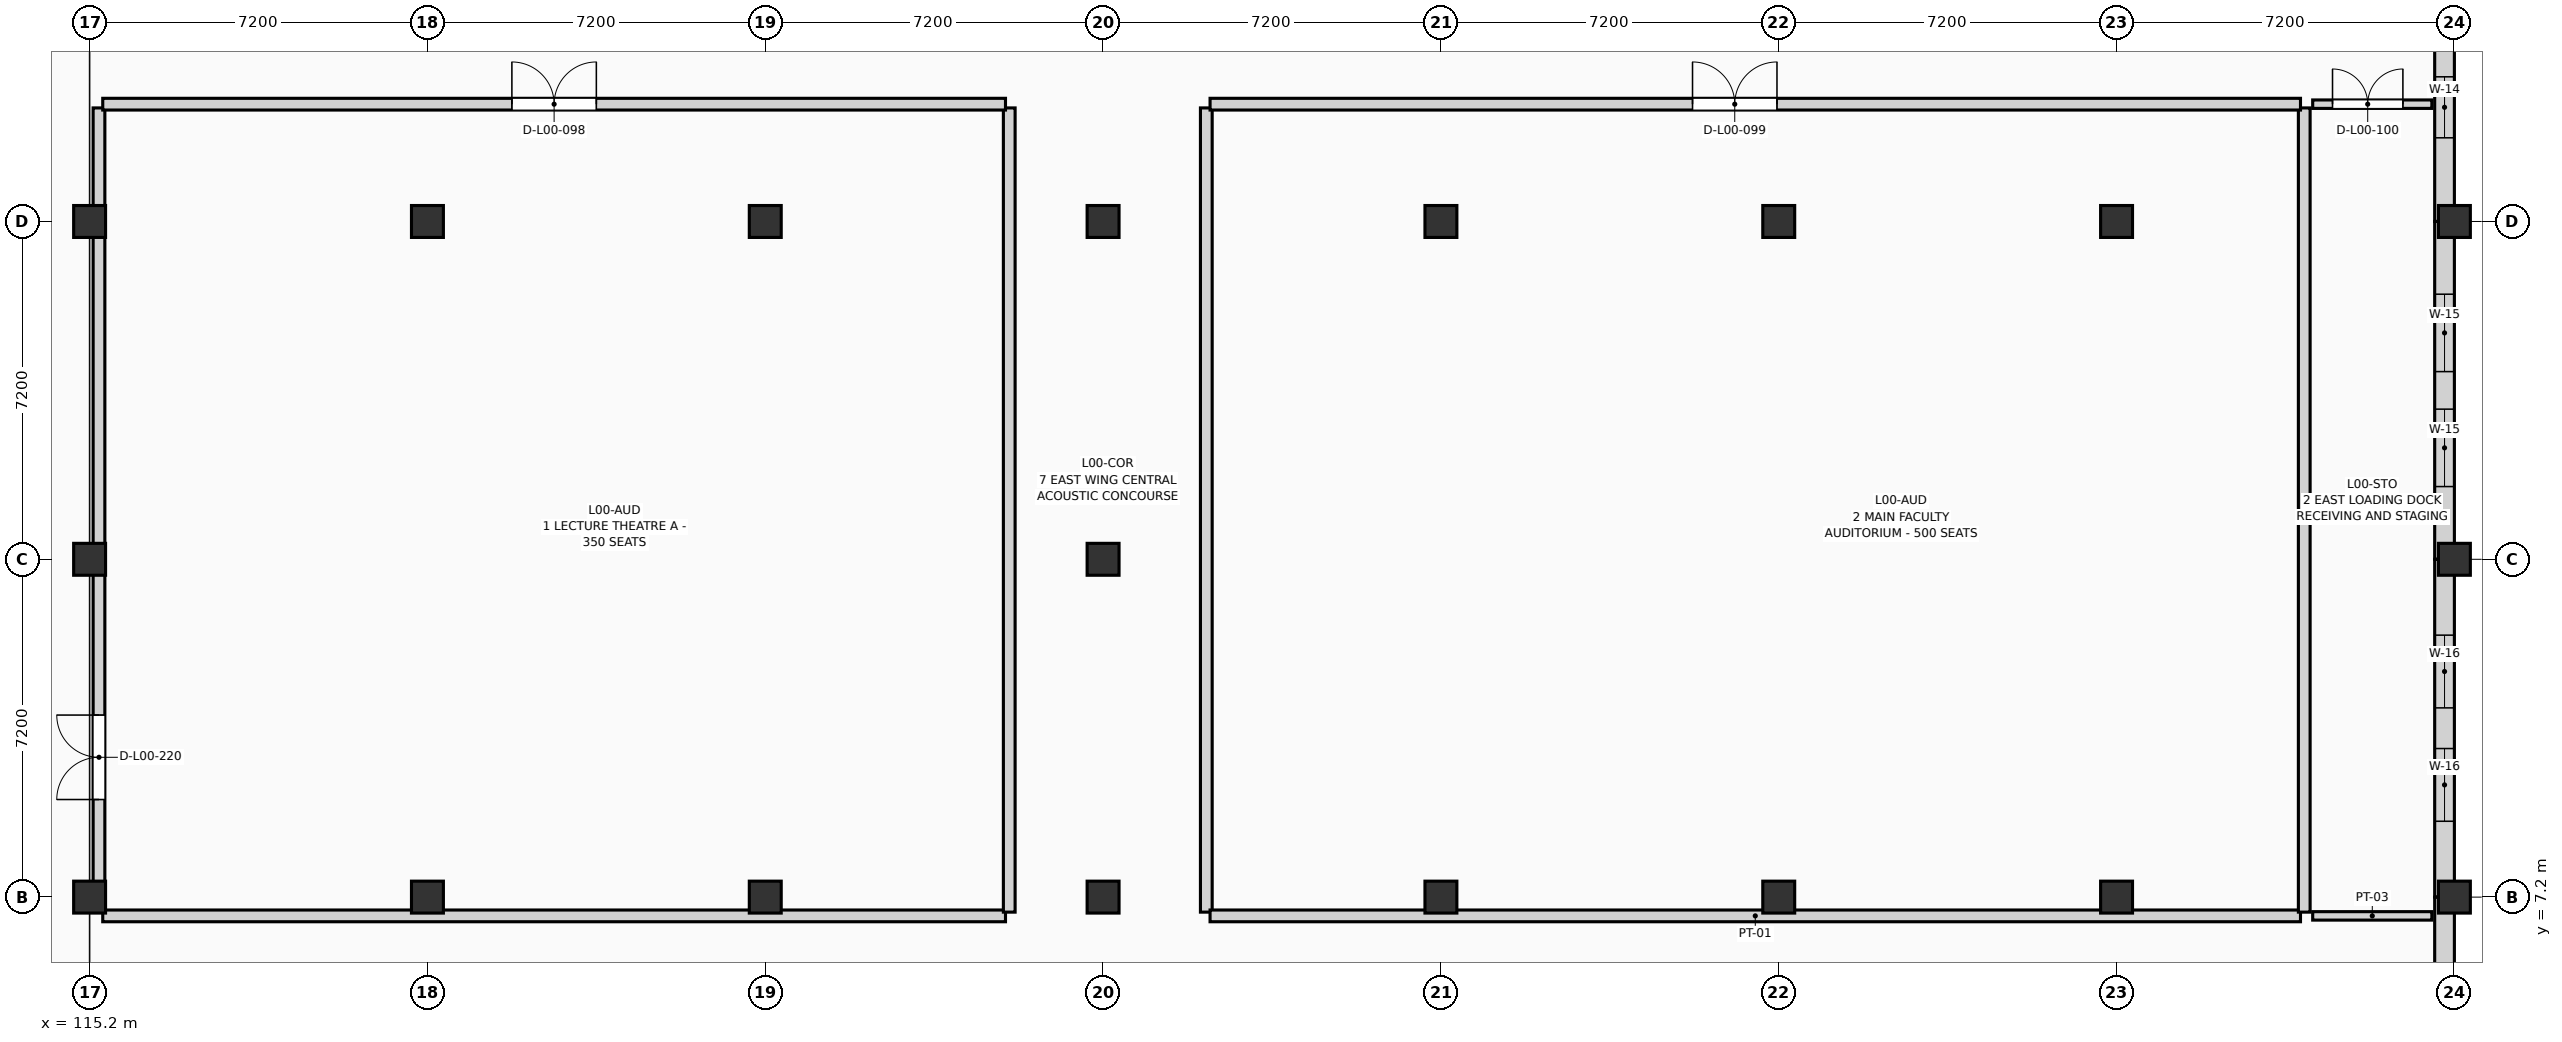
"""IFC4 building model, lengths in metres.
Left out: names, types, materials, properties, quantities, classifications, styles, units other than length and angle.
Written with IfcOpenShell. Run it as: python <this file> out.ifc"""

import sys

from ifc_helpers import new_model, si_unit, direction, frame, frame_2d, origin, origin_2d, place, context, subcontext, project, spatial, rectangle, extrude, element, fill, save


model = new_model("IFC4")
c1 = context("Model", 3, precision=1e-05, world=origin(), true_north=direction((0.0, 1.0)))
c2 = subcontext(c1, "Body", "Model", "MODEL_VIEW")
j1 = project(units=[si_unit("LENGTHUNIT", "METRE"), si_unit("PLANEANGLEUNIT", "RADIAN")], contexts=[c1])
p1 = place(None, origin())
s1 = spatial("IfcSite", under=j1, at=p1, CompositionType="ELEMENT")
p2 = place(p1, origin())
s2 = spatial("IfcBuilding", under=s1, at=p2, CompositionType="ELEMENT")
p3 = place(p2, origin())
s3 = spatial("IfcBuildingStorey", under=s2, at=p3, CompositionType="ELEMENT", Elevation=0.0)
for number, where, z_axis, x_axis in (
    (1, (115.2, 7.2, 0.0), (0.0, 0.0, 1.0), (1.0, 0.0, 0.0)),
    (2, (115.2, 14.4, 0.0), (0.0, 0.0, 1.0), (1.0, 0.0, 0.0)),
    (3, (115.2, 21.6, 0.0), (0.0, 0.0, 1.0), (1.0, 0.0, 0.0)),
    (4, (122.4, 7.2, 0.0), (0.0, 0.0, 1.0), (1.0, 0.0, 0.0)),
    (5, (122.4, 21.6, 0.0), (0.0, 0.0, 1.0), (1.0, 0.0, 0.0)),
    (6, (129.6, 7.2, 0.0), (0.0, 0.0, 1.0), (1.0, 0.0, 0.0)),
    (7, (129.6, 21.6, 0.0), (0.0, 0.0, 1.0), (1.0, 0.0, 0.0)),
    (8, (136.8, 7.2, 0.0), (0.0, 0.0, 1.0), (1.0, 0.0, 0.0)),
    (9, (136.8, 14.4, 0.0), (0.0, 0.0, 1.0), (1.0, 0.0, 0.0)),
    (10, (136.8, 21.6, 0.0), (0.0, 0.0, 1.0), (1.0, 0.0, 0.0)),
    (11, (144.0, 7.2, 0.0), (0.0, 0.0, 1.0), (1.0, 0.0, 0.0)),
    (12, (144.0, 21.6, 0.0), (0.0, 0.0, 1.0), (1.0, 0.0, 0.0)),
    (13, (151.2, 7.2, 0.0), (0.0, 0.0, 1.0), (1.0, 0.0, 0.0)),
    (14, (151.2, 21.6, 0.0), (0.0, 0.0, 1.0), (1.0, 0.0, 0.0)),
    (15, (158.4, 7.2, 0.0), (0.0, 0.0, 1.0), (1.0, 0.0, 0.0)),
    (16, (158.4, 21.6, 0.0), (0.0, 0.0, 1.0), (1.0, 0.0, 0.0)),
    (17, (165.6, 7.2, 0.0), (0.0, 0.0, 1.0), (1.0, 0.0, 0.0)),
    (18, (165.6, 14.4, 0.0), (0.0, 0.0, 1.0), (1.0, 0.0, 0.0)),
    (19, (165.6, 21.6, 0.0), (0.0, 0.0, 1.0), (1.0, 0.0, 0.0)),
):
    element("IfcColumn", number, at=place(p3, frame(where, z_axis=z_axis, x_axis=x_axis)), inside=s3, PredefinedType="COLUMN", context=c2, shape_type="SweptSolid", body=[
        extrude(rectangle(XDim=0.68, YDim=0.68, at=origin_2d()), origin(), (0.0, 0.0, 1.0), 4.5),
    ])
p4 = place(p3, frame((165.39, 21.6, 0.0), z_axis=(0.0, 0.0, 1.0), x_axis=(0.0, 1.0, 0.0)))
e20 = element("IfcWall", 20, at=p4, inside=s3, PredefinedType="SOLIDWALL", context=c2, shape_type="SweptSolid", body=[
    extrude(rectangle(XDim=7.2, YDim=0.42, at=frame_2d((3.6, 0.0))), origin(), (0.0, 0.0, 1.0), 3.62),
])
p5 = place(p4, frame((1.783, 0.0, 0.45)))
e21 = element("IfcOpeningElement", 21, at=p5, cuts=e20, PredefinedType="OPENING", context=c2, shape_type="SweptSolid", body=[
    extrude(rectangle(XDim=1.3, YDim=2.5, at=frame_2d((0.65, 1.25))), frame((0.0, 0.222, 0.0), z_axis=(0.0, -1.0, 0.0), x_axis=(1.0, 0.0, 0.0)), (0.0, 0.0, 1.0), 0.444),
])
p6 = place(p4, frame((4.117, 0.0, 0.45)))
e22 = element("IfcOpeningElement", 22, at=p6, cuts=e20, PredefinedType="OPENING", context=c2, shape_type="SweptSolid", body=[
    extrude(rectangle(XDim=1.3, YDim=2.5, at=frame_2d((0.65, 1.25))), frame((0.0, 0.222, 0.0), z_axis=(0.0, -1.0, 0.0), x_axis=(1.0, 0.0, 0.0)), (0.0, 0.0, 1.0), 0.444),
])
p7 = place(p3, frame((165.39, 14.4, 0.0), z_axis=(0.0, 0.0, 1.0), x_axis=(0.0, 1.0, 0.0)))
e23 = element("IfcWall", 23, at=p7, inside=s3, PredefinedType="SOLIDWALL", context=c2, shape_type="SweptSolid", body=[
    extrude(rectangle(XDim=7.2, YDim=0.42, at=frame_2d((3.6, 0.0))), origin(), (0.0, 0.0, 1.0), 3.62),
])
p8 = place(p7, frame((1.55, 0.0, 0.45)))
e24 = element("IfcOpeningElement", 24, at=p8, cuts=e23, PredefinedType="OPENING", context=c2, shape_type="SweptSolid", body=[
    extrude(rectangle(XDim=1.65, YDim=2.6, at=frame_2d((0.825, 1.3))), frame((0.0, 0.222, 0.0), z_axis=(0.0, -1.0, 0.0), x_axis=(1.0, 0.0, 0.0)), (0.0, 0.0, 1.0), 0.444),
])
p9 = place(p7, frame((4.0, 0.0, 0.45)))
e25 = element("IfcOpeningElement", 25, at=p9, cuts=e23, PredefinedType="OPENING", context=c2, shape_type="SweptSolid", body=[
    extrude(rectangle(XDim=1.65, YDim=2.6, at=frame_2d((0.825, 1.3))), frame((0.0, 0.222, 0.0), z_axis=(0.0, -1.0, 0.0), x_axis=(1.0, 0.0, 0.0)), (0.0, 0.0, 1.0), 0.444),
])
p10 = place(p3, frame((165.39, 7.2, 0.0), z_axis=(0.0, 0.0, 1.0), x_axis=(0.0, 1.0, 0.0)))
e26 = element("IfcWall", 26, at=p10, inside=s3, PredefinedType="SOLIDWALL", context=c2, shape_type="SweptSolid", body=[
    extrude(rectangle(XDim=7.2, YDim=0.42, at=frame_2d((3.6, 0.0))), origin(), (0.0, 0.0, 1.0), 3.62),
])
p11 = place(p10, frame((1.617, 0.0, 0.45)))
e27 = element("IfcOpeningElement", 27, at=p11, cuts=e26, PredefinedType="OPENING", context=c2, shape_type="SweptSolid", body=[
    extrude(rectangle(XDim=1.55, YDim=2.55, at=frame_2d((0.775, 1.275))), frame((0.0, 0.222, 0.0), z_axis=(0.0, -1.0, 0.0), x_axis=(1.0, 0.0, 0.0)), (0.0, 0.0, 1.0), 0.444),
])
p12 = place(p10, frame((4.033, 0.0, 0.45)))
e28 = element("IfcOpeningElement", 28, at=p12, cuts=e26, PredefinedType="OPENING", context=c2, shape_type="SweptSolid", body=[
    extrude(rectangle(XDim=1.55, YDim=2.55, at=frame_2d((0.775, 1.275))), frame((0.0, 0.222, 0.0), z_axis=(0.0, -1.0, 0.0), x_axis=(1.0, 0.0, 0.0)), (0.0, 0.0, 1.0), 0.444),
])
p13 = place(p3, frame((165.39, 0.0, 0.0), z_axis=(0.0, 0.0, 1.0), x_axis=(0.0, 1.0, 0.0)))
e29 = element("IfcWall", 29, at=p13, inside=s3, PredefinedType="SOLIDWALL", context=c2, shape_type="SweptSolid", body=[
    extrude(rectangle(XDim=7.2, YDim=0.42, at=frame_2d((3.6, 0.0))), origin(), (0.0, 0.0, 1.0), 3.62),
])
p14 = place(p13, frame((2.4, 0.0, 0.0)))
e30 = element("IfcOpeningElement", 30, at=p14, cuts=e29, PredefinedType="OPENING", context=c2, shape_type="SweptSolid", body=[
    extrude(rectangle(XDim=2.4, YDim=2.6, at=frame_2d((1.2, 1.3))), frame((0.0, 0.222, 0.0), z_axis=(0.0, -1.0, 0.0), x_axis=(1.0, 0.0, 0.0)), (0.0, 0.0, 1.0), 0.444),
])
p15 = place(p3, frame((115.4, 6.88, 0.0), z_axis=(0.0, 0.0, 1.0), x_axis=(0.0, 1.0, 0.0)))
e31 = element("IfcWall", 31, at=p15, inside=s3, PredefinedType="PARTITIONING", context=c2, shape_type="SweptSolid", body=[
    extrude(rectangle(XDim=17.14, YDim=0.25, at=frame_2d((8.57, 0.0))), origin(), (0.0, 0.0, 1.0), 3.385),
])
p16 = place(p15, frame((2.4, 0.0, 0.0)))
e32 = element("IfcOpeningElement", 32, at=p16, cuts=e31, PredefinedType="OPENING", context=c2, shape_type="SweptSolid", body=[
    extrude(rectangle(XDim=1.8, YDim=2.3, at=frame_2d((0.9, 1.15))), frame((0.0, 0.137, 0.0), z_axis=(0.0, -1.0, 0.0), x_axis=(1.0, 0.0, 0.0)), (0.0, 0.0, 1.0), 0.274),
])
p17 = place(p3, frame((115.48, 6.8, 0.0), z_axis=(0.0, 0.0, 1.0), x_axis=(1.0, 0.0, 0.0)))
e33 = element("IfcWall", 33, at=p17, inside=s3, PredefinedType="PARTITIONING", context=c2, shape_type="SweptSolid", body=[
    extrude(rectangle(XDim=19.24, YDim=0.25, at=frame_2d((9.62, 0.0))), origin(), (0.0, 0.0, 1.0), 7.525),
])
p18 = place(p3, frame((134.8, 6.88, 0.0), z_axis=(0.0, 0.0, 1.0), x_axis=(0.0, 1.0, 0.0)))
e34 = element("IfcWall", 34, at=p18, inside=s3, PredefinedType="PARTITIONING", context=c2, shape_type="SweptSolid", body=[
    extrude(rectangle(XDim=17.14, YDim=0.25, at=frame_2d((8.57, 0.0))), origin(), (0.0, 0.0, 1.0), 8.185),
])
p19 = place(p3, frame((115.48, 24.1, 0.0), z_axis=(0.0, 0.0, 1.0), x_axis=(1.0, 0.0, 0.0)))
e35 = element("IfcWall", 35, at=p19, inside=s3, PredefinedType="PARTITIONING", context=c2, shape_type="SweptSolid", body=[
    extrude(rectangle(XDim=19.24, YDim=0.25, at=frame_2d((9.62, 0.0))), origin(), (0.0, 0.0, 1.0), 8.185),
])
p20 = place(p19, frame((8.72, 0.0, 0.0)))
e36 = element("IfcOpeningElement", 36, at=p20, cuts=e35, PredefinedType="OPENING", context=c2, shape_type="SweptSolid", body=[
    extrude(rectangle(XDim=1.8, YDim=2.3, at=frame_2d((0.9, 1.15))), frame((0.0, 0.137, 0.0), z_axis=(0.0, -1.0, 0.0), x_axis=(1.0, 0.0, 0.0)), (0.0, 0.0, 1.0), 0.274),
])
p21 = place(p3, frame((139.0, 6.88, 0.0), z_axis=(0.0, 0.0, 1.0), x_axis=(0.0, 1.0, 0.0)))
e37 = element("IfcWall", 37, at=p21, inside=s3, PredefinedType="PARTITIONING", context=c2, shape_type="SweptSolid", body=[
    extrude(rectangle(XDim=17.14, YDim=0.25, at=frame_2d((8.57, 0.0))), origin(), (0.0, 0.0, 1.0), 8.185),
])
p22 = place(p3, frame((139.08, 6.8, 0.0), z_axis=(0.0, 0.0, 1.0), x_axis=(1.0, 0.0, 0.0)))
e38 = element("IfcWall", 38, at=p22, inside=s3, PredefinedType="PARTITIONING", context=c2, shape_type="SweptSolid", body=[
    extrude(rectangle(XDim=23.24, YDim=0.25, at=frame_2d((11.62, 0.0))), origin(), (0.0, 0.0, 1.0), 7.525),
])
p23 = place(p3, frame((162.4, 6.88, 0.0), z_axis=(0.0, 0.0, 1.0), x_axis=(0.0, 1.0, 0.0)))
e39 = element("IfcWall", 39, at=p23, inside=s3, PredefinedType="PARTITIONING", context=c2, shape_type="SweptSolid", body=[
    extrude(rectangle(XDim=17.14, YDim=0.25, at=frame_2d((8.57, 0.0))), origin(), (0.0, 0.0, 1.0), 8.185),
])
p24 = place(p3, frame((139.08, 24.1, 0.0), z_axis=(0.0, 0.0, 1.0), x_axis=(1.0, 0.0, 0.0)))
e40 = element("IfcWall", 40, at=p24, inside=s3, PredefinedType="PARTITIONING", context=c2, shape_type="SweptSolid", body=[
    extrude(rectangle(XDim=23.24, YDim=0.25, at=frame_2d((11.62, 0.0))), origin(), (0.0, 0.0, 1.0), 8.185),
])
p25 = place(p24, frame((10.282, 0.0, 0.0)))
e41 = element("IfcOpeningElement", 41, at=p25, cuts=e40, PredefinedType="OPENING", context=c2, shape_type="SweptSolid", body=[
    extrude(rectangle(XDim=1.8, YDim=2.3, at=frame_2d((0.9, 1.15))), frame((0.0, 0.137, 0.0), z_axis=(0.0, -1.0, 0.0), x_axis=(1.0, 0.0, 0.0)), (0.0, 0.0, 1.0), 0.274),
])
p26 = place(p3, frame((162.58, 6.8, 0.0), z_axis=(0.0, 0.0, 1.0), x_axis=(1.0, 0.0, 0.0)))
e42 = element("IfcWall", 42, at=p26, inside=s3, PredefinedType="PARTITIONING", context=c2, shape_type="SweptSolid", body=[
    extrude(rectangle(XDim=2.54, YDim=0.18, at=frame_2d((1.27, 0.0))), origin(), (0.0, 0.0, 1.0), 4.235),
])
p27 = place(p3, frame((162.58, 24.1, 0.0), z_axis=(0.0, 0.0, 1.0), x_axis=(1.0, 0.0, 0.0)))
e43 = element("IfcWall", 43, at=p27, inside=s3, PredefinedType="PARTITIONING", context=c2, shape_type="SweptSolid", body=[
    extrude(rectangle(XDim=2.54, YDim=0.18, at=frame_2d((1.27, 0.0))), origin(), (0.0, 0.0, 1.0), 4.235),
])
p28 = place(p27, frame((0.423, 0.0, 0.0)))
e44 = element("IfcOpeningElement", 44, at=p28, cuts=e43, PredefinedType="OPENING", context=c2, shape_type="SweptSolid", body=[
    extrude(rectangle(XDim=1.5, YDim=2.25, at=frame_2d((0.75, 1.125))), frame((0.0, 0.102, 0.0), z_axis=(0.0, -1.0, 0.0), x_axis=(1.0, 0.0, 0.0)), (0.0, 0.0, 1.0), 0.204),
])
p29 = place(p5, origin())
e45 = element("IfcWindow", 45, at=p29, inside=s3, PartitioningType="SINGLE_PANEL", PredefinedType="WINDOW", context=c2, shape_type="SweptSolid", body=[
    extrude(rectangle(XDim=1.3, YDim=2.5, at=frame_2d((0.65, 1.25))), frame((0.0, 0.03, 0.0), z_axis=(0.0, -1.0, 0.0), x_axis=(1.0, 0.0, 0.0)), (0.0, 0.0, 1.0), 0.06),
])
fill(e21, e45)
p30 = place(p8, origin())
e46 = element("IfcWindow", 46, at=p30, inside=s3, PartitioningType="SINGLE_PANEL", PredefinedType="WINDOW", context=c2, shape_type="SweptSolid", body=[
    extrude(rectangle(XDim=1.65, YDim=2.6, at=frame_2d((0.825, 1.3))), frame((0.0, 0.03, 0.0), z_axis=(0.0, -1.0, 0.0), x_axis=(1.0, 0.0, 0.0)), (0.0, 0.0, 1.0), 0.06),
])
fill(e24, e46)
p31 = place(p9, origin())
e47 = element("IfcWindow", 47, at=p31, inside=s3, PartitioningType="SINGLE_PANEL", PredefinedType="WINDOW", context=c2, shape_type="SweptSolid", body=[
    extrude(rectangle(XDim=1.65, YDim=2.6, at=frame_2d((0.825, 1.3))), frame((0.0, 0.03, 0.0), z_axis=(0.0, -1.0, 0.0), x_axis=(1.0, 0.0, 0.0)), (0.0, 0.0, 1.0), 0.06),
])
fill(e25, e47)
p32 = place(p11, origin())
e48 = element("IfcWindow", 48, at=p32, inside=s3, PartitioningType="SINGLE_PANEL", PredefinedType="WINDOW", context=c2, shape_type="SweptSolid", body=[
    extrude(rectangle(XDim=1.55, YDim=2.55, at=frame_2d((0.775, 1.275))), frame((0.0, 0.03, 0.0), z_axis=(0.0, -1.0, 0.0), x_axis=(1.0, 0.0, 0.0)), (0.0, 0.0, 1.0), 0.06),
])
fill(e27, e48)
p33 = place(p12, origin())
e49 = element("IfcWindow", 49, at=p33, inside=s3, PartitioningType="SINGLE_PANEL", PredefinedType="WINDOW", context=c2, shape_type="SweptSolid", body=[
    extrude(rectangle(XDim=1.55, YDim=2.55, at=frame_2d((0.775, 1.275))), frame((0.0, 0.03, 0.0), z_axis=(0.0, -1.0, 0.0), x_axis=(1.0, 0.0, 0.0)), (0.0, 0.0, 1.0), 0.06),
])
fill(e28, e49)
p34 = place(p20, origin())
e50 = element("IfcDoor", 50, at=p34, inside=s3, OperationType="DOUBLE_DOOR_SINGLE_SWING", PredefinedType="DOOR", context=c2, shape_type="SweptSolid", body=[
    extrude(rectangle(XDim=1.8, YDim=2.3, at=frame_2d((0.9, 1.15))), frame((0.0, 0.025, 0.0), z_axis=(0.0, -1.0, 0.0), x_axis=(1.0, 0.0, 0.0)), (0.0, 0.0, 1.0), 0.05),
])
fill(e36, e50)
p35 = place(p25, origin())
e51 = element("IfcDoor", 51, at=p35, inside=s3, OperationType="DOUBLE_DOOR_SINGLE_SWING", PredefinedType="DOOR", context=c2, shape_type="SweptSolid", body=[
    extrude(rectangle(XDim=1.8, YDim=2.3, at=frame_2d((0.9, 1.15))), frame((0.0, 0.025, 0.0), z_axis=(0.0, -1.0, 0.0), x_axis=(1.0, 0.0, 0.0)), (0.0, 0.0, 1.0), 0.05),
])
fill(e41, e51)
p36 = place(p28, origin())
e52 = element("IfcDoor", 52, at=p36, inside=s3, OperationType="DOUBLE_DOOR_SINGLE_SWING", PredefinedType="DOOR", context=c2, shape_type="SweptSolid", body=[
    extrude(rectangle(XDim=1.5, YDim=2.25, at=frame_2d((0.75, 1.125))), frame((0.0, 0.025, 0.0), z_axis=(0.0, -1.0, 0.0), x_axis=(1.0, 0.0, 0.0)), (0.0, 0.0, 1.0), 0.05),
])
fill(e44, e52)
p37 = place(p16, origin())
e53 = element("IfcDoor", 53, at=p37, inside=s3, OperationType="DOUBLE_DOOR_SINGLE_SWING", PredefinedType="DOOR", context=c2, shape_type="SweptSolid", body=[
    extrude(rectangle(XDim=1.8, YDim=2.3, at=frame_2d((0.9, 1.15))), frame((0.0, 0.025, 0.0), z_axis=(0.0, -1.0, 0.0), x_axis=(1.0, 0.0, 0.0)), (0.0, 0.0, 1.0), 0.05),
])
fill(e32, e53)
save(model, sys.argv[1])
